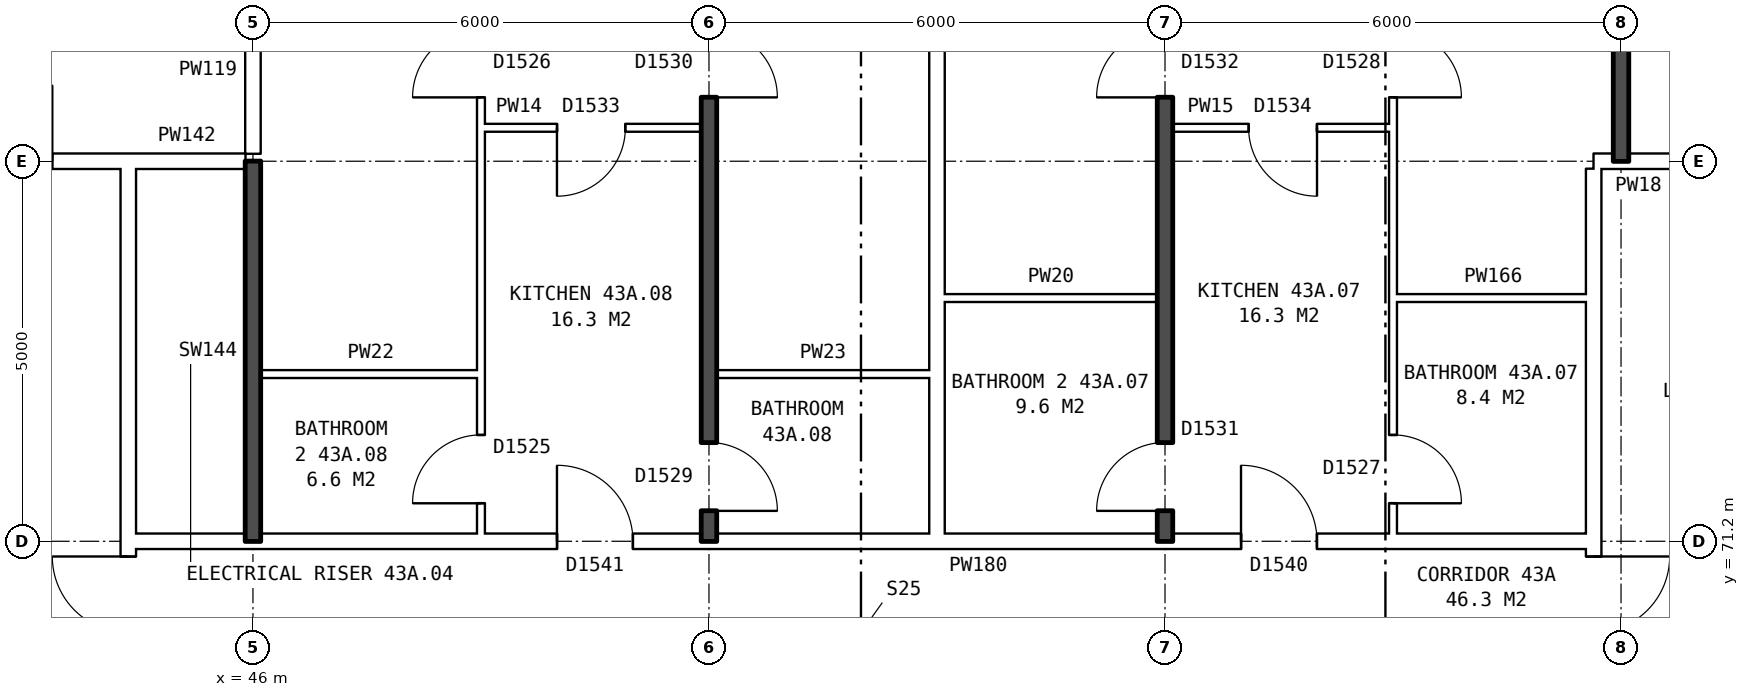
"""IFC4 building model, lengths in metres.
Left out: names, types, materials, properties, quantities, classifications, styles, units other than length and angle.
Written with IfcOpenShell. Run it as: python <this file> out.ifc"""

import sys

from ifc_helpers import new_model, si_unit, direction, frame, frame_2d, origin, place, context, subcontext, project, spatial, rectangle, extrude, element, fill, save


model = new_model("IFC4")
c1 = context("Model", 3, precision=1e-05, world=origin(), true_north=direction((0.0, 1.0)))
c2 = subcontext(c1, "Body", "Model", "MODEL_VIEW")
j1 = project(units=[si_unit("LENGTHUNIT", "METRE"), si_unit("PLANEANGLEUNIT", "RADIAN")], contexts=[c1])
p1 = place(None, origin())
s1 = spatial("IfcSite", under=j1, at=p1, CompositionType="ELEMENT")
p2 = place(p1, origin())
s2 = spatial("IfcBuilding", under=s1, at=p2, CompositionType="ELEMENT")
p3 = place(p2, frame((0.0, 0.0, 154.7)))
s3 = spatial("IfcBuildingStorey", under=s2, at=p3, CompositionType="ELEMENT", Elevation=154.7)
p4 = place(p3, frame((63.64, 63.9, 0.0), z_axis=(0.0, 0.0, 1.0), x_axis=(0.0, 1.0, 0.0)))
e1 = element("IfcWall", 1, at=p4, inside=s3, PredefinedType="PARTITIONING", context=c2, shape_type="SweptSolid", body=[
    extrude(rectangle(XDim=12.2, YDim=0.2, at=frame_2d((6.1, 0.0))), origin(), (0.0, 0.0, 1.0), 2.85),
])
p5 = place(p4, frame((5.1, 0.0, 0.0)))
e2 = element("IfcOpeningElement", 2, at=p5, cuts=e1, PredefinedType="OPENING", context=c2, shape_type="SweptSolid", body=[
    extrude(rectangle(XDim=2.0, YDim=2.1, at=frame_2d((1.0, 1.05))), frame((0.0, 0.11, 0.0), z_axis=(0.0, -1.0, 0.0), x_axis=(1.0, 0.0, 0.0)), (0.0, 0.0, 1.0), 0.22),
])
p6 = place(p3, frame((44.36, 63.9, 0.0), z_axis=(0.0, 0.0, 1.0), x_axis=(0.0, 1.0, 0.0)))
e3 = element("IfcWall", 3, at=p6, inside=s3, PredefinedType="PARTITIONING", context=c2, shape_type="SweptSolid", body=[
    extrude(rectangle(XDim=12.2, YDim=0.2, at=frame_2d((6.1, 0.0))), origin(), (0.0, 0.0, 1.0), 2.85),
])
p7 = place(p6, frame((5.1, 0.0, 0.0)))
e4 = element("IfcOpeningElement", 4, at=p7, cuts=e3, PredefinedType="OPENING", context=c2, shape_type="SweptSolid", body=[
    extrude(rectangle(XDim=2.0, YDim=2.1, at=frame_2d((1.0, 1.05))), frame((0.0, 0.11, 0.0), z_axis=(0.0, -1.0, 0.0), x_axis=(1.0, 0.0, 0.0)), (0.0, 0.0, 1.0), 0.22),
])
p8 = place(p3, frame((44.36, 71.2, 0.0), z_axis=(0.0, 0.0, 1.0), x_axis=(1.0, 0.0, 0.0)))
e5 = element("IfcWall", 5, at=p8, inside=s3, PredefinedType="PARTITIONING", context=c2, shape_type="SweptSolid", body=[
    extrude(rectangle(XDim=19.28, YDim=0.2, at=frame_2d((9.64, 0.0))), origin(), (0.0, 0.0, 1.0), 2.85),
])
p9 = place(p8, frame((14.64, 0.0, 0.0)))
e6 = element("IfcOpeningElement", 6, at=p9, cuts=e5, PredefinedType="OPENING", context=c2, shape_type="SweptSolid", body=[
    extrude(rectangle(XDim=1.0, YDim=2.1, at=frame_2d((0.5, 1.05))), frame((0.0, 0.11, 0.0), z_axis=(0.0, -1.0, 0.0), x_axis=(1.0, 0.0, 0.0)), (0.0, 0.0, 1.0), 0.22),
])
p10 = place(p8, frame((5.64, 0.0, 0.0)))
e7 = element("IfcOpeningElement", 7, at=p10, cuts=e5, PredefinedType="OPENING", context=c2, shape_type="SweptSolid", body=[
    extrude(rectangle(XDim=1.0, YDim=2.1, at=frame_2d((0.5, 1.05))), frame((0.0, 0.11, 0.0), z_axis=(0.0, -1.0, 0.0), x_axis=(1.0, 0.0, 0.0)), (0.0, 0.0, 1.0), 0.22),
])
p11 = place(p3, frame((46.1, 73.4, 0.0), z_axis=(0.0, 0.0, 1.0), x_axis=(1.0, 0.0, 0.0)))
e8 = element("IfcWall", 8, at=p11, inside=s3, PredefinedType="PARTITIONING", context=c2, shape_type="SweptSolid", body=[
    extrude(rectangle(XDim=2.9, YDim=0.1, at=frame_2d((1.45, 0.0))), origin(), (0.0, 0.0, 1.0), 2.85),
])
for number, where, z_axis, x_axis in (
    (9, (52.1, 73.4, 0.0), (0.0, 0.0, 1.0), (1.0, 0.0, 0.0)),
    (10, (55.1, 74.4, 0.0), (0.0, 0.0, 1.0), (1.0, 0.0, 0.0)),
):
    element("IfcWall", number, at=place(p3, frame(where, z_axis=z_axis, x_axis=x_axis)), inside=s3, PredefinedType="PARTITIONING", context=c2, shape_type="SweptSolid", body=[
        extrude(rectangle(XDim=2.8, YDim=0.1, at=frame_2d((1.4, 0.0))), origin(), (0.0, 0.0, 1.0), 2.85),
    ])
p12 = place(p3, frame((61.0, 74.4, 0.0), z_axis=(0.0, 0.0, 1.0), x_axis=(1.0, 0.0, 0.0)))
e11 = element("IfcWall", 11, at=p12, inside=s3, PredefinedType="PARTITIONING", context=c2, shape_type="SweptSolid", body=[
    extrude(rectangle(XDim=2.64, YDim=0.1, at=frame_2d((1.32, 0.0))), origin(), (0.0, 0.0, 1.0), 2.85),
])
p13 = place(p3, frame((41.36, 76.2, 0.0), z_axis=(0.0, 0.0, 1.0), x_axis=(1.0, 0.0, 0.0)))
e12 = element("IfcWall", 12, at=p13, inside=s3, PredefinedType="PARTITIONING", context=c2, shape_type="SweptSolid", body=[
    extrude(rectangle(XDim=3.0, YDim=0.2, at=frame_2d((1.5, 0.0))), origin(), (0.0, 0.0, 1.0), 2.85),
])
p14 = place(p13, frame((1.0, 0.0, 0.0)))
e13 = element("IfcOpeningElement", 13, at=p14, cuts=e12, PredefinedType="OPENING", context=c2, shape_type="SweptSolid", body=[
    extrude(rectangle(XDim=1.0, YDim=2.1, at=frame_2d((0.5, 1.05))), frame((0.0, 0.11, 0.0), z_axis=(0.0, -1.0, 0.0), x_axis=(1.0, 0.0, 0.0)), (0.0, 0.0, 1.0), 0.22),
])
p15 = place(p3, frame((44.36, 76.2, 0.0), z_axis=(0.0, 0.0, 1.0), x_axis=(1.0, 0.0, 0.0)))
e14 = element("IfcWall", 14, at=p15, inside=s3, PredefinedType="PARTITIONING", context=c2, shape_type="SweptSolid", body=[
    extrude(rectangle(XDim=1.54, YDim=0.2, at=frame_2d((0.77, 0.0))), origin(), (0.0, 0.0, 1.0), 2.85),
])
p16 = place(p3, frame((63.64, 76.2, 0.0), z_axis=(0.0, 0.0, 1.0), x_axis=(1.0, 0.0, 0.0)))
e15 = element("IfcWall", 15, at=p16, inside=s3, PredefinedType="PARTITIONING", context=c2, shape_type="SweptSolid", body=[
    extrude(rectangle(XDim=3.0, YDim=0.2, at=frame_2d((1.5, 0.0))), origin(), (0.0, 0.0, 1.0), 2.85),
])
p17 = place(p16, frame((1.18, 0.0, 0.0)))
e16 = element("IfcOpeningElement", 16, at=p17, cuts=e15, PredefinedType="OPENING", context=c2, shape_type="SweptSolid", body=[
    extrude(rectangle(XDim=1.0, YDim=2.1, at=frame_2d((0.5, 1.05))), frame((0.0, 0.11, 0.0), z_axis=(0.0, -1.0, 0.0), x_axis=(1.0, 0.0, 0.0)), (0.0, 0.0, 1.0), 0.22),
])
p18 = place(p3, frame((49.0, 76.64, 0.0), z_axis=(0.0, 0.0, 1.0), x_axis=(1.0, 0.0, 0.0)))
e17 = element("IfcWall", 17, at=p18, inside=s3, PredefinedType="PARTITIONING", context=c2, shape_type="SweptSolid", body=[
    extrude(rectangle(XDim=2.9, YDim=0.1, at=frame_2d((1.45, 0.0))), origin(), (0.0, 0.0, 1.0), 2.85),
])
p19 = place(p18, frame((1.0, 0.0, 0.0)))
e18 = element("IfcOpeningElement", 18, at=p19, cuts=e17, PredefinedType="OPENING", context=c2, shape_type="SweptSolid", body=[
    extrude(rectangle(XDim=0.9, YDim=2.1, at=frame_2d((0.45, 1.05))), frame((0.0, 0.06, 0.0), z_axis=(0.0, -1.0, 0.0), x_axis=(1.0, 0.0, 0.0)), (0.0, 0.0, 1.0), 0.12),
])
p20 = place(p3, frame((58.1, 76.64, 0.0), z_axis=(0.0, 0.0, 1.0), x_axis=(1.0, 0.0, 0.0)))
e19 = element("IfcWall", 19, at=p20, inside=s3, PredefinedType="PARTITIONING", context=c2, shape_type="SweptSolid", body=[
    extrude(rectangle(XDim=2.9, YDim=0.1, at=frame_2d((1.45, 0.0))), origin(), (0.0, 0.0, 1.0), 2.85),
])
p21 = place(p20, frame((1.0, 0.0, 0.0)))
e20 = element("IfcOpeningElement", 20, at=p21, cuts=e19, PredefinedType="OPENING", context=c2, shape_type="SweptSolid", body=[
    extrude(rectangle(XDim=0.9, YDim=2.1, at=frame_2d((0.45, 1.05))), frame((0.0, 0.06, 0.0), z_axis=(0.0, -1.0, 0.0), x_axis=(1.0, 0.0, 0.0)), (0.0, 0.0, 1.0), 0.12),
])
p22 = place(p3, frame((46.0, 71.2, 0.0), z_axis=(0.0, 0.0, 1.0), x_axis=(0.0, 1.0, 0.0)))
e21 = element("IfcWall", 21, at=p22, inside=s3, PredefinedType="SOLIDWALL", context=c2, shape_type="SweptSolid", body=[
    extrude(rectangle(XDim=5.0, YDim=0.2, at=frame_2d((2.5, 0.0))), origin(), (0.0, 0.0, 1.0), 2.85),
])
p23 = place(p3, frame((46.0, 76.3, 0.0), z_axis=(0.0, 0.0, 1.0), x_axis=(0.0, 1.0, 0.0)))
e22 = element("IfcWall", 22, at=p23, inside=s3, PredefinedType="PARTITIONING", context=c2, shape_type="SweptSolid", body=[
    extrude(rectangle(XDim=2.2, YDim=0.2, at=frame_2d((1.1, 0.0))), origin(), (0.0, 0.0, 1.0), 2.85),
])
p24 = place(p3, frame((49.0, 71.3, 0.0), z_axis=(0.0, 0.0, 1.0), x_axis=(0.0, 1.0, 0.0)))
e23 = element("IfcWall", 23, at=p24, inside=s3, PredefinedType="PARTITIONING", context=c2, shape_type="SweptSolid", body=[
    extrude(rectangle(XDim=14.34, YDim=0.1, at=frame_2d((7.17, 0.0))), origin(), (0.0, 0.0, 1.0), 2.85),
])
p25 = place(p24, frame((5.74, 0.0, 0.0)))
e24 = element("IfcOpeningElement", 24, at=p25, cuts=e23, PredefinedType="OPENING", context=c2, shape_type="SweptSolid", body=[
    extrude(rectangle(XDim=0.9, YDim=2.1, at=frame_2d((0.45, 1.05))), frame((0.0, 0.06, 0.0), z_axis=(0.0, -1.0, 0.0), x_axis=(1.0, 0.0, 0.0)), (0.0, 0.0, 1.0), 0.12),
])
p26 = place(p24, frame((0.4, 0.0, 0.0)))
e25 = element("IfcOpeningElement", 25, at=p26, cuts=e23, PredefinedType="OPENING", context=c2, shape_type="SweptSolid", body=[
    extrude(rectangle(XDim=0.9, YDim=2.1, at=frame_2d((0.45, 1.05))), frame((0.0, 0.06, 0.0), z_axis=(0.0, -1.0, 0.0), x_axis=(1.0, 0.0, 0.0)), (0.0, 0.0, 1.0), 0.12),
])
p27 = place(p3, frame((52.0, 71.2, 0.0), z_axis=(0.0, 0.0, 1.0), x_axis=(0.0, 1.0, 0.0)))
e26 = element("IfcWall", 26, at=p27, inside=s3, PredefinedType="SOLIDWALL", context=c2, shape_type="SweptSolid", body=[
    extrude(rectangle(XDim=14.44, YDim=0.2, at=frame_2d((7.22, 0.0))), origin(), (0.0, 0.0, 1.0), 2.85),
])
p28 = place(p27, frame((5.84, 0.0, 0.0)))
e27 = element("IfcOpeningElement", 27, at=p28, cuts=e26, PredefinedType="OPENING", context=c2, shape_type="SweptSolid", body=[
    extrude(rectangle(XDim=0.9, YDim=2.1, at=frame_2d((0.45, 1.05))), frame((0.0, 0.11, 0.0), z_axis=(0.0, -1.0, 0.0), x_axis=(1.0, 0.0, 0.0)), (0.0, 0.0, 1.0), 0.22),
])
p29 = place(p27, frame((0.4, 0.0, 0.0)))
e28 = element("IfcOpeningElement", 28, at=p29, cuts=e26, PredefinedType="OPENING", context=c2, shape_type="SweptSolid", body=[
    extrude(rectangle(XDim=0.9, YDim=2.1, at=frame_2d((0.45, 1.05))), frame((0.0, 0.11, 0.0), z_axis=(0.0, -1.0, 0.0), x_axis=(1.0, 0.0, 0.0)), (0.0, 0.0, 1.0), 0.22),
])
p30 = place(p3, frame((55.0, 71.3, 0.0), z_axis=(0.0, 0.0, 1.0), x_axis=(0.0, 1.0, 0.0)))
e29 = element("IfcWall", 29, at=p30, inside=s3, PredefinedType="PARTITIONING", context=c2, shape_type="SweptSolid", body=[
    extrude(rectangle(XDim=14.34, YDim=0.2, at=frame_2d((7.17, 0.0))), origin(), (0.0, 0.0, 1.0), 2.85),
])
p31 = place(p3, frame((58.0, 71.2, 0.0), z_axis=(0.0, 0.0, 1.0), x_axis=(0.0, 1.0, 0.0)))
e30 = element("IfcWall", 30, at=p31, inside=s3, PredefinedType="SOLIDWALL", context=c2, shape_type="SweptSolid", body=[
    extrude(rectangle(XDim=14.44, YDim=0.2, at=frame_2d((7.22, 0.0))), origin(), (0.0, 0.0, 1.0), 2.85),
])
p32 = place(p31, frame((5.84, 0.0, 0.0)))
e31 = element("IfcOpeningElement", 31, at=p32, cuts=e30, PredefinedType="OPENING", context=c2, shape_type="SweptSolid", body=[
    extrude(rectangle(XDim=0.9, YDim=2.1, at=frame_2d((0.45, 1.05))), frame((0.0, 0.11, 0.0), z_axis=(0.0, -1.0, 0.0), x_axis=(1.0, 0.0, 0.0)), (0.0, 0.0, 1.0), 0.22),
])
p33 = place(p31, frame((0.4, 0.0, 0.0)))
e32 = element("IfcOpeningElement", 32, at=p33, cuts=e30, PredefinedType="OPENING", context=c2, shape_type="SweptSolid", body=[
    extrude(rectangle(XDim=0.9, YDim=2.1, at=frame_2d((0.45, 1.05))), frame((0.0, 0.11, 0.0), z_axis=(0.0, -1.0, 0.0), x_axis=(1.0, 0.0, 0.0)), (0.0, 0.0, 1.0), 0.22),
])
p34 = place(p3, frame((61.0, 71.3, 0.0), z_axis=(0.0, 0.0, 1.0), x_axis=(0.0, 1.0, 0.0)))
e33 = element("IfcWall", 33, at=p34, inside=s3, PredefinedType="PARTITIONING", context=c2, shape_type="SweptSolid", body=[
    extrude(rectangle(XDim=14.34, YDim=0.1, at=frame_2d((7.17, 0.0))), origin(), (0.0, 0.0, 1.0), 2.85),
])
p35 = place(p34, frame((5.74, 0.0, 0.0)))
e34 = element("IfcOpeningElement", 34, at=p35, cuts=e33, PredefinedType="OPENING", context=c2, shape_type="SweptSolid", body=[
    extrude(rectangle(XDim=0.9, YDim=2.1, at=frame_2d((0.45, 1.05))), frame((0.0, 0.06, 0.0), z_axis=(0.0, -1.0, 0.0), x_axis=(1.0, 0.0, 0.0)), (0.0, 0.0, 1.0), 0.12),
])
p36 = place(p34, frame((0.4, 0.0, 0.0)))
e35 = element("IfcOpeningElement", 35, at=p36, cuts=e33, PredefinedType="OPENING", context=c2, shape_type="SweptSolid", body=[
    extrude(rectangle(XDim=0.9, YDim=2.1, at=frame_2d((0.45, 1.05))), frame((0.0, 0.06, 0.0), z_axis=(0.0, -1.0, 0.0), x_axis=(1.0, 0.0, 0.0)), (0.0, 0.0, 1.0), 0.12),
])
p37 = place(p3, frame((64.0, 76.2, 0.0), z_axis=(0.0, 0.0, 1.0), x_axis=(0.0, 1.0, 0.0)))
e36 = element("IfcWall", 36, at=p37, inside=s3, PredefinedType="SOLIDWALL", context=c2, shape_type="SweptSolid", body=[
    extrude(rectangle(XDim=9.44, YDim=0.2, at=frame_2d((4.72, 0.0))), origin(), (0.0, 0.0, 1.0), 2.85),
])
p38 = place(p5, frame((2.0, 0.0, 0.0), z_axis=(0.0, 0.0, 1.0), x_axis=(-1.0, 0.0, 0.0)))
e37 = element("IfcDoor", 37, at=p38, inside=s3, OperationType="DOUBLE_DOOR_SINGLE_SWING", PredefinedType="DOOR", context=c2, shape_type="SweptSolid", body=[
    extrude(rectangle(XDim=2.0, YDim=2.1, at=frame_2d((1.0, 1.05))), frame((0.0, 0.025, 0.0), z_axis=(0.0, -1.0, 0.0), x_axis=(1.0, 0.0, 0.0)), (0.0, 0.0, 1.0), 0.05),
])
fill(e2, e37)
p39 = place(p7, origin())
e38 = element("IfcDoor", 38, at=p39, inside=s3, OperationType="DOUBLE_DOOR_SINGLE_SWING", PredefinedType="DOOR", context=c2, shape_type="SweptSolid", body=[
    extrude(rectangle(XDim=2.0, YDim=2.1, at=frame_2d((1.0, 1.05))), frame((0.0, 0.025, 0.0), z_axis=(0.0, -1.0, 0.0), x_axis=(1.0, 0.0, 0.0)), (0.0, 0.0, 1.0), 0.05),
])
fill(e4, e38)
p40 = place(p35, frame((0.9, 0.0, 0.0), z_axis=(0.0, 0.0, 1.0), x_axis=(-1.0, 0.0, 0.0)))
e39 = element("IfcDoor", 39, at=p40, inside=s3, OperationType="SINGLE_SWING_RIGHT", PredefinedType="DOOR", context=c2, shape_type="SweptSolid", body=[
    extrude(rectangle(XDim=0.9, YDim=2.1, at=frame_2d((0.45, 1.05))), frame((0.0, 0.025, 0.0), z_axis=(0.0, -1.0, 0.0), x_axis=(1.0, 0.0, 0.0)), (0.0, 0.0, 1.0), 0.05),
])
fill(e34, e39)
p41 = place(p32, origin())
e40 = element("IfcDoor", 40, at=p41, inside=s3, OperationType="SINGLE_SWING_LEFT", PredefinedType="DOOR", context=c2, shape_type="SweptSolid", body=[
    extrude(rectangle(XDim=0.9, YDim=2.1, at=frame_2d((0.45, 1.05))), frame((0.0, 0.025, 0.0), z_axis=(0.0, -1.0, 0.0), x_axis=(1.0, 0.0, 0.0)), (0.0, 0.0, 1.0), 0.05),
])
fill(e31, e40)
p42 = place(p9, origin())
e41 = element("IfcDoor", 41, at=p42, inside=s3, OperationType="SINGLE_SWING_LEFT", PredefinedType="DOOR", context=c2, shape_type="SweptSolid", body=[
    extrude(rectangle(XDim=1.0, YDim=2.1, at=frame_2d((0.5, 1.05))), frame((0.0, 0.025, 0.0), z_axis=(0.0, -1.0, 0.0), x_axis=(1.0, 0.0, 0.0)), (0.0, 0.0, 1.0), 0.05),
])
fill(e6, e41)
p43 = place(p21, frame((0.9, 0.0, 0.0), z_axis=(0.0, 0.0, 1.0), x_axis=(-1.0, 0.0, 0.0)))
e42 = element("IfcDoor", 42, at=p43, inside=s3, OperationType="SINGLE_SWING_LEFT", PredefinedType="DOOR", context=c2, shape_type="SweptSolid", body=[
    extrude(rectangle(XDim=0.9, YDim=2.1, at=frame_2d((0.45, 1.05))), frame((0.0, 0.025, 0.0), z_axis=(0.0, -1.0, 0.0), x_axis=(1.0, 0.0, 0.0)), (0.0, 0.0, 1.0), 0.05),
])
fill(e20, e42)
p44 = place(p36, frame((0.9, 0.0, 0.0), z_axis=(0.0, 0.0, 1.0), x_axis=(-1.0, 0.0, 0.0)))
e43 = element("IfcDoor", 43, at=p44, inside=s3, OperationType="SINGLE_SWING_RIGHT", PredefinedType="DOOR", context=c2, shape_type="SweptSolid", body=[
    extrude(rectangle(XDim=0.9, YDim=2.1, at=frame_2d((0.45, 1.05))), frame((0.0, 0.025, 0.0), z_axis=(0.0, -1.0, 0.0), x_axis=(1.0, 0.0, 0.0)), (0.0, 0.0, 1.0), 0.05),
])
fill(e35, e43)
p45 = place(p33, origin())
e44 = element("IfcDoor", 44, at=p45, inside=s3, OperationType="SINGLE_SWING_LEFT", PredefinedType="DOOR", context=c2, shape_type="SweptSolid", body=[
    extrude(rectangle(XDim=0.9, YDim=2.1, at=frame_2d((0.45, 1.05))), frame((0.0, 0.025, 0.0), z_axis=(0.0, -1.0, 0.0), x_axis=(1.0, 0.0, 0.0)), (0.0, 0.0, 1.0), 0.05),
])
fill(e32, e44)
p46 = place(p28, frame((0.9, 0.0, 0.0), z_axis=(0.0, 0.0, 1.0), x_axis=(-1.0, 0.0, 0.0)))
e45 = element("IfcDoor", 45, at=p46, inside=s3, OperationType="SINGLE_SWING_RIGHT", PredefinedType="DOOR", context=c2, shape_type="SweptSolid", body=[
    extrude(rectangle(XDim=0.9, YDim=2.1, at=frame_2d((0.45, 1.05))), frame((0.0, 0.025, 0.0), z_axis=(0.0, -1.0, 0.0), x_axis=(1.0, 0.0, 0.0)), (0.0, 0.0, 1.0), 0.05),
])
fill(e27, e45)
p47 = place(p25, origin())
e46 = element("IfcDoor", 46, at=p47, inside=s3, OperationType="SINGLE_SWING_LEFT", PredefinedType="DOOR", context=c2, shape_type="SweptSolid", body=[
    extrude(rectangle(XDim=0.9, YDim=2.1, at=frame_2d((0.45, 1.05))), frame((0.0, 0.025, 0.0), z_axis=(0.0, -1.0, 0.0), x_axis=(1.0, 0.0, 0.0)), (0.0, 0.0, 1.0), 0.05),
])
fill(e24, e46)
p48 = place(p10, origin())
e47 = element("IfcDoor", 47, at=p48, inside=s3, OperationType="SINGLE_SWING_LEFT", PredefinedType="DOOR", context=c2, shape_type="SweptSolid", body=[
    extrude(rectangle(XDim=1.0, YDim=2.1, at=frame_2d((0.5, 1.05))), frame((0.0, 0.025, 0.0), z_axis=(0.0, -1.0, 0.0), x_axis=(1.0, 0.0, 0.0)), (0.0, 0.0, 1.0), 0.05),
])
fill(e7, e47)
p49 = place(p19, frame((0.9, 0.0, 0.0), z_axis=(0.0, 0.0, 1.0), x_axis=(-1.0, 0.0, 0.0)))
e48 = element("IfcDoor", 48, at=p49, inside=s3, OperationType="SINGLE_SWING_RIGHT", PredefinedType="DOOR", context=c2, shape_type="SweptSolid", body=[
    extrude(rectangle(XDim=0.9, YDim=2.1, at=frame_2d((0.45, 1.05))), frame((0.0, 0.025, 0.0), z_axis=(0.0, -1.0, 0.0), x_axis=(1.0, 0.0, 0.0)), (0.0, 0.0, 1.0), 0.05),
])
fill(e18, e48)
p50 = place(p29, frame((0.9, 0.0, 0.0), z_axis=(0.0, 0.0, 1.0), x_axis=(-1.0, 0.0, 0.0)))
e49 = element("IfcDoor", 49, at=p50, inside=s3, OperationType="SINGLE_SWING_RIGHT", PredefinedType="DOOR", context=c2, shape_type="SweptSolid", body=[
    extrude(rectangle(XDim=0.9, YDim=2.1, at=frame_2d((0.45, 1.05))), frame((0.0, 0.025, 0.0), z_axis=(0.0, -1.0, 0.0), x_axis=(1.0, 0.0, 0.0)), (0.0, 0.0, 1.0), 0.05),
])
fill(e28, e49)
p51 = place(p26, origin())
e50 = element("IfcDoor", 50, at=p51, inside=s3, OperationType="SINGLE_SWING_LEFT", PredefinedType="DOOR", context=c2, shape_type="SweptSolid", body=[
    extrude(rectangle(XDim=0.9, YDim=2.1, at=frame_2d((0.45, 1.05))), frame((0.0, 0.025, 0.0), z_axis=(0.0, -1.0, 0.0), x_axis=(1.0, 0.0, 0.0)), (0.0, 0.0, 1.0), 0.05),
])
fill(e25, e50)
save(model, sys.argv[1])
